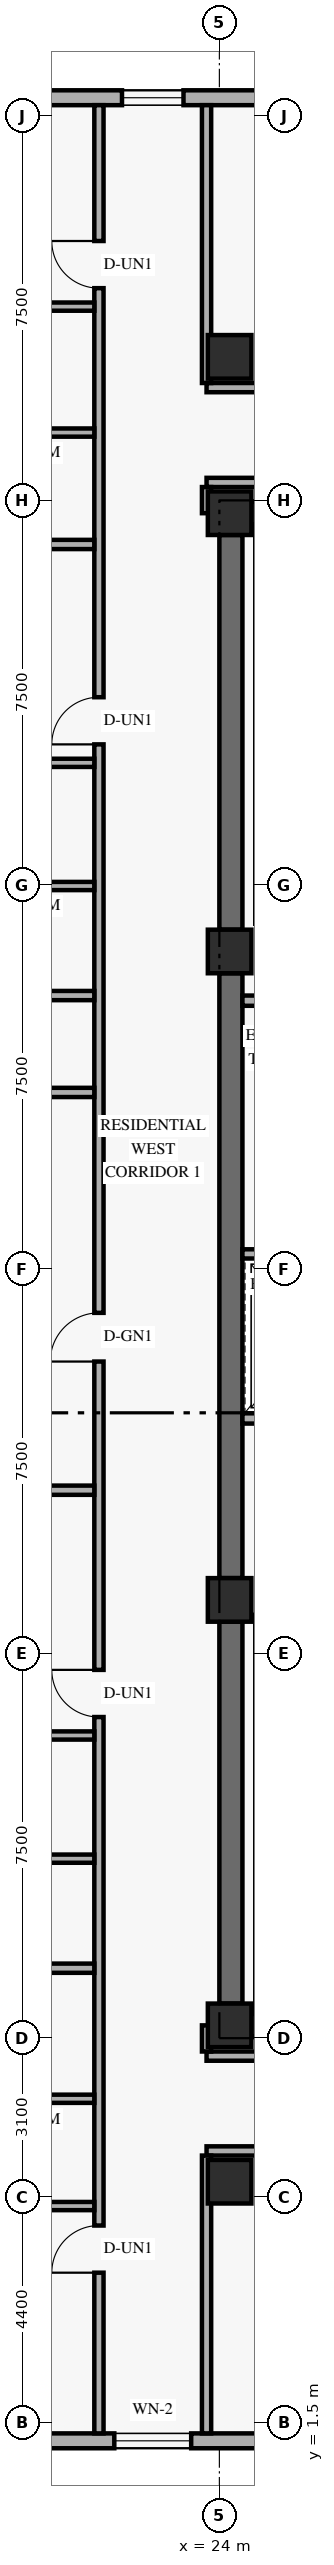
"""IFC4 building model, lengths in metres.
Left out: names, types, materials, properties, quantities, classifications, styles, units other than length and angle.
Written with IfcOpenShell. Run it as: python <this file> out.ifc"""

import sys

from ifc_helpers import new_model, si_unit, direction, frame, frame_2d, origin, origin_2d, place, context, subcontext, project, spatial, rectangle, extrude, element, fill, save


model = new_model("IFC4")
c1 = context("Model", 3, precision=1e-05, world=origin(), true_north=direction((0.0, 1.0)))
c2 = subcontext(c1, "Body", "Model", "MODEL_VIEW")
j1 = project(units=[si_unit("LENGTHUNIT", "METRE"), si_unit("PLANEANGLEUNIT", "RADIAN")], contexts=[c1])
p1 = place(None, origin())
s1 = spatial("IfcSite", under=j1, at=p1, CompositionType="ELEMENT")
p2 = place(p1, origin())
s2 = spatial("IfcBuilding", under=s1, at=p2, CompositionType="ELEMENT")
p3 = place(p2, frame((0.0, 0.0, 56.4)))
s3 = spatial("IfcBuildingStorey", under=s2, at=p3, CompositionType="ELEMENT", Elevation=56.4)
p4 = place(p3, frame((24.225, 9.675, 0.0), z_axis=(0.0, 0.0, 1.0), x_axis=(0.0, 1.0, 0.0)))
e1 = element("IfcWall", 1, at=p4, inside=s3, PredefinedType="SHEAR", context=c2, shape_type="SweptSolid", body=[
    extrude(rectangle(XDim=7.45, YDim=0.45, at=frame_2d((3.725, 0.0))), origin(), (0.0, 0.0, 1.0), 2.657),
])
p5 = place(p3, frame((24.225, 17.975, 0.0), z_axis=(0.0, 0.0, 1.0), x_axis=(0.0, 1.0, 0.0)))
e2 = element("IfcWall", 2, at=p5, inside=s3, PredefinedType="SHEAR", context=c2, shape_type="SweptSolid", body=[
    extrude(rectangle(XDim=11.8, YDim=0.45, at=frame_2d((5.9, 0.0))), origin(), (0.0, 0.0, 1.0), 2.657),
])
p6 = place(p3, frame((24.225, 30.625, 0.0), z_axis=(0.0, 0.0, 1.0), x_axis=(0.0, 1.0, 0.0)))
e3 = element("IfcWall", 3, at=p6, inside=s3, PredefinedType="SHEAR", context=c2, shape_type="SweptSolid", body=[
    extrude(rectangle(XDim=7.7, YDim=0.45, at=frame_2d((3.85, 0.0))), origin(), (0.0, 0.0, 1.0), 2.657),
])
for number, where, z_axis, x_axis in (
    (4, (24.625, 9.25, 0.0), (0.0, 0.0, 1.0), (1.0, 0.0, 0.0)),
    (5, (24.625, 38.75, 0.0), (0.0, 0.0, 1.0), (1.0, 0.0, 0.0)),
):
    element("IfcWall", number, at=place(p3, frame(where, z_axis=z_axis, x_axis=x_axis)), inside=s3, PredefinedType="SHEAR", context=c2, shape_type="SweptSolid", body=[
        extrude(rectangle(XDim=10.15, YDim=0.45, at=frame_2d((5.075, 0.0))), origin(), (0.0, 0.0, 1.0), 3.35),
    ])
for number, where, z_axis, x_axis in (
    (6, (24.2, 6.2, 0.0), (0.0, 0.0, 1.0), (1.0, 0.0, 0.0)),
    (7, (24.2, 9.25, 0.0), (0.0, 0.0, 1.0), (1.0, 0.0, 0.0)),
    (8, (24.2, 17.55, 0.0), (0.0, 0.0, 1.0), (1.0, 0.0, 0.0)),
    (9, (24.2, 30.2, 0.0), (0.0, 0.0, 1.0), (1.0, 0.0, 0.0)),
    (10, (24.2, 38.75, 0.0), (0.0, 0.0, 1.0), (1.0, 0.0, 0.0)),
    (11, (24.2, 41.8, 0.0), (0.0, 0.0, 1.0), (1.0, 0.0, 0.0)),
):
    element("IfcColumn", number, at=place(p3, frame(where, z_axis=z_axis, x_axis=x_axis)), inside=s3, PredefinedType="COLUMN", context=c2, shape_type="SweptSolid", body=[
        extrude(rectangle(XDim=0.85, YDim=0.85, at=origin_2d()), origin(), (0.0, 0.0, 1.0), 3.6),
    ])
p7 = place(p3, frame((5.42, 1.145, 0.0), z_axis=(0.0, 0.0, 1.0), x_axis=(1.0, 0.0, 0.0)))
e12 = element("IfcWall", 12, at=p7, inside=s3, PredefinedType="SOLIDWALL", context=c2, shape_type="SweptSolid", body=[
    extrude(rectangle(XDim=23.481, YDim=0.29, at=frame_2d((11.741, 0.0))), origin(), (0.0, 0.0, 1.0), 3.35),
])
p8 = place(p7, frame((7.365, 0.0, 0.85)))
e13 = element("IfcOpeningElement", 13, at=p8, cuts=e12, PredefinedType="OPENING", context=c2, shape_type="SweptSolid", body=[
    extrude(rectangle(XDim=1.5, YDim=1.55, at=frame_2d((0.75, 0.775))), frame((0.0, 0.155, 0.0), z_axis=(0.0, -1.0, 0.0), x_axis=(1.0, 0.0, 0.0)), (0.0, 0.0, 1.0), 0.31),
])
p9 = place(p7, frame((16.53, 0.0, 0.85)))
e14 = element("IfcOpeningElement", 14, at=p9, cuts=e12, PredefinedType="OPENING", context=c2, shape_type="SweptSolid", body=[
    extrude(rectangle(XDim=1.5, YDim=1.55, at=frame_2d((0.75, 0.775))), frame((0.0, 0.155, 0.0), z_axis=(0.0, -1.0, 0.0), x_axis=(1.0, 0.0, 0.0)), (0.0, 0.0, 1.0), 0.31),
])
p10 = place(p7, frame((20.156, 0.0, 0.85)))
e15 = element("IfcOpeningElement", 15, at=p10, cuts=e12, PredefinedType="OPENING", context=c2, shape_type="SweptSolid", body=[
    extrude(rectangle(XDim=1.5, YDim=1.55, at=frame_2d((0.75, 0.775))), frame((0.0, 0.155, 0.0), z_axis=(0.0, -1.0, 0.0), x_axis=(1.0, 0.0, 0.0)), (0.0, 0.0, 1.0), 0.31),
])
p11 = place(p3, frame((44.98, 46.855, 0.0), z_axis=(0.0, 0.0, 1.0), x_axis=(-1.0, 0.0, 0.0)))
e16 = element("IfcWall", 16, at=p11, inside=s3, PredefinedType="SOLIDWALL", context=c2, shape_type="SweptSolid", body=[
    extrude(rectangle(XDim=39.56, YDim=0.29, at=frame_2d((19.78, 0.0))), origin(), (0.0, 0.0, 1.0), 3.35),
])
p12 = place(p11, frame((30.845, 0.0, 0.85)))
e17 = element("IfcOpeningElement", 17, at=p12, cuts=e16, PredefinedType="OPENING", context=c2, shape_type="SweptSolid", body=[
    extrude(rectangle(XDim=1.2, YDim=1.5, at=frame_2d((0.6, 0.75))), frame((0.0, 0.155, 0.0), z_axis=(0.0, -1.0, 0.0), x_axis=(1.0, 0.0, 0.0)), (0.0, 0.0, 1.0), 0.31),
])
p13 = place(p11, frame((21.68, 0.0, 0.85)))
e18 = element("IfcOpeningElement", 18, at=p13, cuts=e16, PredefinedType="OPENING", context=c2, shape_type="SweptSolid", body=[
    extrude(rectangle(XDim=1.2, YDim=1.5, at=frame_2d((0.6, 0.75))), frame((0.0, 0.155, 0.0), z_axis=(0.0, -1.0, 0.0), x_axis=(1.0, 0.0, 0.0)), (0.0, 0.0, 1.0), 0.31),
])
p14 = place(p11, frame((17.829, 0.0, 0.85)))
e19 = element("IfcOpeningElement", 19, at=p14, cuts=e16, PredefinedType="OPENING", context=c2, shape_type="SweptSolid", body=[
    extrude(rectangle(XDim=1.2, YDim=1.5, at=frame_2d((0.6, 0.75))), frame((0.0, 0.155, 0.0), z_axis=(0.0, -1.0, 0.0), x_axis=(1.0, 0.0, 0.0)), (0.0, 0.0, 1.0), 0.31),
])
p15 = place(p11, frame((11.994, 0.0, 0.85)))
e20 = element("IfcOpeningElement", 20, at=p15, cuts=e16, PredefinedType="OPENING", context=c2, shape_type="SweptSolid", body=[
    extrude(rectangle(XDim=1.2, YDim=1.5, at=frame_2d((0.6, 0.75))), frame((0.0, 0.155, 0.0), z_axis=(0.0, -1.0, 0.0), x_axis=(1.0, 0.0, 0.0)), (0.0, 0.0, 1.0), 0.31),
])
p16 = place(p11, frame((7.895, 0.0, 0.85)))
e21 = element("IfcOpeningElement", 21, at=p16, cuts=e16, PredefinedType="OPENING", context=c2, shape_type="SweptSolid", body=[
    extrude(rectangle(XDim=1.2, YDim=1.5, at=frame_2d((0.6, 0.75))), frame((0.0, 0.155, 0.0), z_axis=(0.0, -1.0, 0.0), x_axis=(1.0, 0.0, 0.0)), (0.0, 0.0, 1.0), 0.31),
])
p17 = place(p11, frame((4.083, 0.0, 0.85)))
e22 = element("IfcOpeningElement", 22, at=p17, cuts=e16, PredefinedType="OPENING", context=c2, shape_type="SweptSolid", body=[
    extrude(rectangle(XDim=1.2, YDim=1.5, at=frame_2d((0.6, 0.75))), frame((0.0, 0.155, 0.0), z_axis=(0.0, -1.0, 0.0), x_axis=(1.0, 0.0, 0.0)), (0.0, 0.0, 1.0), 0.31),
])
p18 = place(p11, frame((0.367, 0.0, 0.85)))
e23 = element("IfcOpeningElement", 23, at=p18, cuts=e16, PredefinedType="OPENING", context=c2, shape_type="SweptSolid", body=[
    extrude(rectangle(XDim=1.2, YDim=1.5, at=frame_2d((0.6, 0.75))), frame((0.0, 0.155, 0.0), z_axis=(0.0, -1.0, 0.0), x_axis=(1.0, 0.0, 0.0)), (0.0, 0.0, 1.0), 0.31),
])
p19 = place(p3, frame((24.45, 21.09, 0.0), z_axis=(0.0, 0.0, 1.0), x_axis=(1.0, 0.0, 0.0)))
e24 = element("IfcWall", 24, at=p19, inside=s3, PredefinedType="STANDARD", context=c2, shape_type="SweptSolid", body=[
    extrude(rectangle(XDim=6.83, YDim=0.2, at=frame_2d((3.415, 0.0))), origin(), (0.0, 0.0, 1.0), 3.35),
])
p20 = place(p19, frame((0.72, 0.0, 0.0)))
e25 = element("IfcOpeningElement", 25, at=p20, cuts=e24, PredefinedType="OPENING", context=c2, shape_type="SweptSolid", body=[
    extrude(rectangle(XDim=1.1, YDim=2.2, at=frame_2d((0.55, 1.1))), frame((0.0, 0.11, 0.0), z_axis=(0.0, -1.0, 0.0), x_axis=(1.0, 0.0, 0.0)), (0.0, 0.0, 1.0), 0.22),
])
p21 = place(p19, frame((3.32, 0.0, 0.0)))
e26 = element("IfcOpeningElement", 26, at=p21, cuts=e24, PredefinedType="OPENING", context=c2, shape_type="SweptSolid", body=[
    extrude(rectangle(XDim=1.1, YDim=2.2, at=frame_2d((0.55, 1.1))), frame((0.0, 0.11, 0.0), z_axis=(0.0, -1.0, 0.0), x_axis=(1.0, 0.0, 0.0)), (0.0, 0.0, 1.0), 0.22),
])
p22 = place(p3, frame((24.45, 24.3, 0.0), z_axis=(0.0, 0.0, 1.0), x_axis=(1.0, 0.0, 0.0)))
e27 = element("IfcWall", 27, at=p22, inside=s3, PredefinedType="STANDARD", context=c2, shape_type="SweptSolid", body=[
    extrude(rectangle(XDim=6.83, YDim=0.18, at=frame_2d((3.415, 0.0))), origin(), (0.0, 0.0, 1.0), 3.35),
])
p23 = place(p3, frame((24.45, 29.24, 0.0), z_axis=(0.0, 0.0, 1.0), x_axis=(1.0, 0.0, 0.0)))
e28 = element("IfcWall", 28, at=p23, inside=s3, PredefinedType="STANDARD", context=c2, shape_type="SweptSolid", body=[
    extrude(rectangle(XDim=3.65, YDim=0.2, at=frame_2d((1.825, 0.0))), origin(), (0.0, 0.0, 1.0), 3.35),
])
p24 = place(p3, frame((21.65, 1.29, 0.0), z_axis=(0.0, 0.0, 1.0), x_axis=(0.0, 1.0, 0.0)))
e29 = element("IfcWall", 29, at=p24, inside=s3, PredefinedType="STANDARD", context=c2, shape_type="SweptSolid", body=[
    extrude(rectangle(XDim=45.42, YDim=0.18, at=frame_2d((22.71, 0.0))), origin(), (0.0, 0.0, 1.0), 2.639),
])
p25 = place(p24, frame((3.135, 0.0, 0.0)))
e30 = element("IfcOpeningElement", 30, at=p25, cuts=e29, PredefinedType="OPENING", context=c2, shape_type="SweptSolid", body=[
    extrude(rectangle(XDim=0.92, YDim=2.15, at=frame_2d((0.46, 1.075))), frame((0.0, 0.1, 0.0), z_axis=(0.0, -1.0, 0.0), x_axis=(1.0, 0.0, 0.0)), (0.0, 0.0, 1.0), 0.2),
])
p26 = place(p24, frame((13.975, 0.0, 0.0)))
e31 = element("IfcOpeningElement", 31, at=p26, cuts=e29, PredefinedType="OPENING", context=c2, shape_type="SweptSolid", body=[
    extrude(rectangle(XDim=0.92, YDim=2.15, at=frame_2d((0.46, 1.075))), frame((0.0, 0.1, 0.0), z_axis=(0.0, -1.0, 0.0), x_axis=(1.0, 0.0, 0.0)), (0.0, 0.0, 1.0), 0.2),
])
p27 = place(p24, frame((20.91, 0.0, 0.0)))
e32 = element("IfcOpeningElement", 32, at=p27, cuts=e29, PredefinedType="OPENING", context=c2, shape_type="SweptSolid", body=[
    extrude(rectangle(XDim=0.95, YDim=2.15, at=frame_2d((0.475, 1.075))), frame((0.0, 0.1, 0.0), z_axis=(0.0, -1.0, 0.0), x_axis=(1.0, 0.0, 0.0)), (0.0, 0.0, 1.0), 0.2),
])
p28 = place(p24, frame((32.95, 0.0, 0.0)))
e33 = element("IfcOpeningElement", 33, at=p28, cuts=e29, PredefinedType="OPENING", context=c2, shape_type="SweptSolid", body=[
    extrude(rectangle(XDim=0.92, YDim=2.15, at=frame_2d((0.46, 1.075))), frame((0.0, 0.1, 0.0), z_axis=(0.0, -1.0, 0.0), x_axis=(1.0, 0.0, 0.0)), (0.0, 0.0, 1.0), 0.2),
])
p29 = place(p24, frame((41.85, 0.0, 0.0)))
e34 = element("IfcOpeningElement", 34, at=p29, cuts=e29, PredefinedType="OPENING", context=c2, shape_type="SweptSolid", body=[
    extrude(rectangle(XDim=0.92, YDim=2.15, at=frame_2d((0.46, 1.075))), frame((0.0, 0.1, 0.0), z_axis=(0.0, -1.0, 0.0), x_axis=(1.0, 0.0, 0.0)), (0.0, 0.0, 1.0), 0.2),
])
p30 = place(p3, frame((23.75, 6.8, 0.0), z_axis=(0.0, 0.0, 1.0), x_axis=(1.0, 0.0, 0.0)))
e35 = element("IfcWall", 35, at=p30, inside=s3, PredefinedType="STANDARD", context=c2, shape_type="SweptSolid", body=[
    extrude(rectangle(XDim=11.67, YDim=0.18, at=frame_2d((5.835, 0.0))), origin(), (0.0, 0.0, 1.0), 2.639),
])
p31 = place(p30, frame((1.5, 0.0, 0.0)))
e36 = element("IfcOpeningElement", 36, at=p31, cuts=e35, PredefinedType="OPENING", context=c2, shape_type="SweptSolid", body=[
    extrude(rectangle(XDim=0.95, YDim=2.15, at=frame_2d((0.475, 1.075))), frame((0.0, 0.1, 0.0), z_axis=(0.0, -1.0, 0.0), x_axis=(1.0, 0.0, 0.0)), (0.0, 0.0, 1.0), 0.2),
])
p32 = place(p30, frame((5.341, 0.0, 0.0)))
e37 = element("IfcOpeningElement", 37, at=p32, cuts=e35, PredefinedType="OPENING", context=c2, shape_type="SweptSolid", body=[
    extrude(rectangle(XDim=0.92, YDim=2.15, at=frame_2d((0.46, 1.075))), frame((0.0, 0.1, 0.0), z_axis=(0.0, -1.0, 0.0), x_axis=(1.0, 0.0, 0.0)), (0.0, 0.0, 1.0), 0.2),
])
p33 = place(p3, frame((23.75, 8.65, 0.0), z_axis=(0.0, 0.0, 1.0), x_axis=(1.0, 0.0, 0.0)))
e38 = element("IfcWall", 38, at=p33, inside=s3, PredefinedType="STANDARD", context=c2, shape_type="SweptSolid", body=[
    extrude(rectangle(XDim=11.67, YDim=0.18, at=frame_2d((5.835, 0.0))), origin(), (0.0, 0.0, 1.0), 2.639),
])
p34 = place(p3, frame((23.75, 41.2, 0.0), z_axis=(0.0, 0.0, 1.0), x_axis=(1.0, 0.0, 0.0)))
e39 = element("IfcWall", 39, at=p34, inside=s3, PredefinedType="STANDARD", context=c2, shape_type="SweptSolid", body=[
    extrude(rectangle(XDim=11.67, YDim=0.18, at=frame_2d((5.835, 0.0))), origin(), (0.0, 0.0, 1.0), 2.639),
])
p35 = place(p34, frame((1.6, 0.0, 0.0)))
e40 = element("IfcOpeningElement", 40, at=p35, cuts=e39, PredefinedType="OPENING", context=c2, shape_type="SweptSolid", body=[
    extrude(rectangle(XDim=0.95, YDim=2.15, at=frame_2d((0.475, 1.075))), frame((0.0, 0.1, 0.0), z_axis=(0.0, -1.0, 0.0), x_axis=(1.0, 0.0, 0.0)), (0.0, 0.0, 1.0), 0.2),
])
p36 = place(p34, frame((8.176, 0.0, 0.0)))
e41 = element("IfcOpeningElement", 41, at=p36, cuts=e39, PredefinedType="OPENING", context=c2, shape_type="SweptSolid", body=[
    extrude(rectangle(XDim=0.92, YDim=2.15, at=frame_2d((0.46, 1.075))), frame((0.0, 0.1, 0.0), z_axis=(0.0, -1.0, 0.0), x_axis=(1.0, 0.0, 0.0)), (0.0, 0.0, 1.0), 0.2),
])
p37 = place(p3, frame((23.75, 39.35, 0.0), z_axis=(0.0, 0.0, 1.0), x_axis=(1.0, 0.0, 0.0)))
e42 = element("IfcWall", 42, at=p37, inside=s3, PredefinedType="STANDARD", context=c2, shape_type="SweptSolid", body=[
    extrude(rectangle(XDim=11.67, YDim=0.18, at=frame_2d((5.835, 0.0))), origin(), (0.0, 0.0, 1.0), 2.639),
])
for number, where, z_axis, x_axis in (
    (43, (23.75, 8.74, 0.0), (0.0, 0.0, 1.0), (0.0, 1.0, 0.0)),
    (44, (23.75, 38.75, 0.0), (0.0, 0.0, 1.0), (0.0, 1.0, 0.0)),
):
    element("IfcWall", number, at=place(p3, frame(where, z_axis=z_axis, x_axis=x_axis)), inside=s3, PredefinedType="STANDARD", context=c2, shape_type="SweptSolid", body=[
        extrude(rectangle(XDim=0.51, YDim=0.18, at=frame_2d((0.255, 0.0))), origin(), (0.0, 0.0, 1.0), 2.639),
    ])
p38 = place(p3, frame((14.68, 27.45, 0.0), z_axis=(0.0, 0.0, 1.0), x_axis=(1.0, 0.0, 0.0)))
e45 = element("IfcWall", 45, at=p38, inside=s3, PredefinedType="STANDARD", context=c2, shape_type="SweptSolid", body=[
    extrude(rectangle(XDim=6.88, YDim=0.18, at=frame_2d((3.44, 0.0))), origin(), (0.0, 0.0, 1.0), 2.639),
])
p39 = place(p3, frame((2.09, 29.34, 0.0), z_axis=(0.0, 0.0, 1.0), x_axis=(1.0, 0.0, 0.0)))
e46 = element("IfcWall", 46, at=p39, inside=s3, PredefinedType="STANDARD", context=c2, shape_type="SweptSolid", body=[
    extrude(rectangle(XDim=19.47, YDim=0.18, at=frame_2d((9.735, 0.0))), origin(), (0.0, 0.0, 1.0), 2.639),
])
p40 = place(p3, frame((2.09, 10.365, 0.0), z_axis=(0.0, 0.0, 1.0), x_axis=(1.0, 0.0, 0.0)))
e47 = element("IfcWall", 47, at=p40, inside=s3, PredefinedType="PARTITIONING", context=c2, shape_type="SweptSolid", body=[
    extrude(rectangle(XDim=19.47, YDim=0.18, at=frame_2d((9.735, 0.0))), origin(), (0.0, 0.0, 1.0), 2.639),
])
p41 = place(p3, frame((14.68, 19.69, 0.0), z_axis=(0.0, 0.0, 1.0), x_axis=(1.0, 0.0, 0.0)))
e48 = element("IfcWall", 48, at=p41, inside=s3, PredefinedType="PARTITIONING", context=c2, shape_type="SweptSolid", body=[
    extrude(rectangle(XDim=6.88, YDim=0.18, at=frame_2d((3.44, 0.0))), origin(), (0.0, 0.0, 1.0), 2.639),
])
p42 = place(p3, frame((16.03, 5.725, 0.0), z_axis=(0.0, 0.0, 1.0), x_axis=(1.0, 0.0, 0.0)))
e49 = element("IfcWall", 49, at=p42, inside=s3, PredefinedType="PLUMBINGWALL", context=c2, shape_type="SweptSolid", body=[
    extrude(rectangle(XDim=5.53, YDim=0.16, at=frame_2d((2.765, 0.0))), origin(), (0.0, 0.0, 1.0), 3.35),
])
p43 = place(p3, frame((16.19, 7.818, 0.0), z_axis=(0.0, 0.0, 1.0), x_axis=(1.0, 0.0, 0.0)))
e50 = element("IfcWall", 50, at=p43, inside=s3, PredefinedType="PLUMBINGWALL", context=c2, shape_type="SweptSolid", body=[
    extrude(rectangle(XDim=5.37, YDim=0.16, at=frame_2d((2.685, 0.0))), origin(), (0.0, 0.0, 1.0), 2.639),
])
p44 = place(p3, frame((19.03, 14.905, 0.0), z_axis=(0.0, 0.0, 1.0), x_axis=(1.0, 0.0, 0.0)))
e51 = element("IfcWall", 51, at=p44, inside=s3, PredefinedType="PLUMBINGWALL", context=c2, shape_type="SweptSolid", body=[
    extrude(rectangle(XDim=2.53, YDim=0.16, at=frame_2d((1.265, 0.0))), origin(), (0.0, 0.0, 1.0), 3.35),
])
p45 = place(p3, frame((19.19, 12.502, 0.0), z_axis=(0.0, 0.0, 1.0), x_axis=(1.0, 0.0, 0.0)))
e52 = element("IfcWall", 52, at=p45, inside=s3, PredefinedType="PLUMBINGWALL", context=c2, shape_type="SweptSolid", body=[
    extrude(rectangle(XDim=2.37, YDim=0.16, at=frame_2d((1.185, 0.0))), origin(), (0.0, 0.0, 1.0), 3.35),
])
p46 = place(p3, frame((2.09, 38.14, 0.0), z_axis=(0.0, 0.0, 1.0), x_axis=(1.0, 0.0, 0.0)))
e53 = element("IfcWall", 53, at=p46, inside=s3, PredefinedType="PARTITIONING", context=c2, shape_type="SweptSolid", body=[
    extrude(rectangle(XDim=19.47, YDim=0.18, at=frame_2d((9.735, 0.0))), origin(), (0.0, 0.0, 1.0), 2.639),
])
p47 = place(p3, frame((16.03, 33.88, 0.0), z_axis=(0.0, 0.0, 1.0), x_axis=(1.0, 0.0, 0.0)))
e54 = element("IfcWall", 54, at=p47, inside=s3, PredefinedType="PLUMBINGWALL", context=c2, shape_type="SweptSolid", body=[
    extrude(rectangle(XDim=5.53, YDim=0.16, at=frame_2d((2.765, 0.0))), origin(), (0.0, 0.0, 1.0), 2.639),
])
p48 = place(p3, frame((16.19, 31.477, 0.0), z_axis=(0.0, 0.0, 1.0), x_axis=(1.0, 0.0, 0.0)))
e55 = element("IfcWall", 55, at=p48, inside=s3, PredefinedType="PLUMBINGWALL", context=c2, shape_type="SweptSolid", body=[
    extrude(rectangle(XDim=5.37, YDim=0.16, at=frame_2d((2.685, 0.0))), origin(), (0.0, 0.0, 1.0), 2.639),
])
p49 = place(p3, frame((16.03, 42.78, 0.0), z_axis=(0.0, 0.0, 1.0), x_axis=(1.0, 0.0, 0.0)))
e56 = element("IfcWall", 56, at=p49, inside=s3, PredefinedType="PLUMBINGWALL", context=c2, shape_type="SweptSolid", body=[
    extrude(rectangle(XDim=5.53, YDim=0.16, at=frame_2d((2.765, 0.0))), origin(), (0.0, 0.0, 1.0), 3.35),
])
p50 = place(p3, frame((16.19, 40.323, 0.0), z_axis=(0.0, 0.0, 1.0), x_axis=(1.0, 0.0, 0.0)))
e57 = element("IfcWall", 57, at=p50, inside=s3, PredefinedType="PLUMBINGWALL", context=c2, shape_type="SweptSolid", body=[
    extrude(rectangle(XDim=5.37, YDim=0.16, at=frame_2d((2.685, 0.0))), origin(), (0.0, 0.0, 1.0), 2.639),
])
for number, where, z_axis, x_axis in (
    (58, (23.75, 1.29, 0.0), (0.0, 0.0, 1.0), (0.0, 1.0, 0.0)),
    (59, (23.75, 41.29, 0.0), (0.0, 0.0, 1.0), (0.0, 1.0, 0.0)),
):
    element("IfcWall", number, at=place(p3, frame(where, z_axis=z_axis, x_axis=x_axis)), inside=s3, PredefinedType="PARTITIONING", context=c2, shape_type="SweptSolid", body=[
        extrude(rectangle(XDim=5.42, YDim=0.18, at=frame_2d((2.71, 0.0))), origin(), (0.0, 0.0, 1.0), 2.799),
    ])
p51 = place(p9, origin())
e60 = element("IfcWindow", 60, at=p51, inside=s3, PartitioningType="SINGLE_PANEL", PredefinedType="WINDOW", context=c2, shape_type="SweptSolid", body=[
    extrude(rectangle(XDim=1.5, YDim=1.55, at=frame_2d((0.75, 0.775))), frame((0.0, 0.03, 0.0), z_axis=(0.0, -1.0, 0.0), x_axis=(1.0, 0.0, 0.0)), (0.0, 0.0, 1.0), 0.06),
])
fill(e14, e60)
p52 = place(p13, origin())
e61 = element("IfcWindow", 61, at=p52, inside=s3, PartitioningType="SINGLE_PANEL", PredefinedType="WINDOW", context=c2, shape_type="SweptSolid", body=[
    extrude(rectangle(XDim=1.2, YDim=1.5, at=frame_2d((0.6, 0.75))), frame((0.0, 0.03, 0.0), z_axis=(0.0, -1.0, 0.0), x_axis=(1.0, 0.0, 0.0)), (0.0, 0.0, 1.0), 0.06),
])
fill(e18, e61)
p53 = place(p25, origin())
e62 = element("IfcDoor", 62, at=p53, inside=s3, OperationType="SINGLE_SWING_LEFT", PredefinedType="DOOR", context=c2, shape_type="SweptSolid", body=[
    extrude(rectangle(XDim=0.92, YDim=2.15, at=frame_2d((0.46, 1.075))), frame((0.0, 0.025, 0.0), z_axis=(0.0, -1.0, 0.0), x_axis=(1.0, 0.0, 0.0)), (0.0, 0.0, 1.0), 0.05),
])
fill(e30, e62)
p54 = place(p26, origin())
e63 = element("IfcDoor", 63, at=p54, inside=s3, OperationType="SINGLE_SWING_RIGHT", PredefinedType="DOOR", context=c2, shape_type="SweptSolid", body=[
    extrude(rectangle(XDim=0.92, YDim=2.15, at=frame_2d((0.46, 1.075))), frame((0.0, 0.025, 0.0), z_axis=(0.0, -1.0, 0.0), x_axis=(1.0, 0.0, 0.0)), (0.0, 0.0, 1.0), 0.05),
])
fill(e31, e63)
p55 = place(p27, origin())
e64 = element("IfcDoor", 64, at=p55, inside=s3, OperationType="SINGLE_SWING_LEFT", PredefinedType="DOOR", context=c2, shape_type="SweptSolid", body=[
    extrude(rectangle(XDim=0.95, YDim=2.15, at=frame_2d((0.475, 1.075))), frame((0.0, 0.025, 0.0), z_axis=(0.0, -1.0, 0.0), x_axis=(1.0, 0.0, 0.0)), (0.0, 0.0, 1.0), 0.05),
])
fill(e32, e64)
p56 = place(p28, origin())
e65 = element("IfcDoor", 65, at=p56, inside=s3, OperationType="SINGLE_SWING_LEFT", PredefinedType="DOOR", context=c2, shape_type="SweptSolid", body=[
    extrude(rectangle(XDim=0.92, YDim=2.15, at=frame_2d((0.46, 1.075))), frame((0.0, 0.025, 0.0), z_axis=(0.0, -1.0, 0.0), x_axis=(1.0, 0.0, 0.0)), (0.0, 0.0, 1.0), 0.05),
])
fill(e33, e65)
p57 = place(p29, origin())
e66 = element("IfcDoor", 66, at=p57, inside=s3, OperationType="SINGLE_SWING_RIGHT", PredefinedType="DOOR", context=c2, shape_type="SweptSolid", body=[
    extrude(rectangle(XDim=0.92, YDim=2.15, at=frame_2d((0.46, 1.075))), frame((0.0, 0.025, 0.0), z_axis=(0.0, -1.0, 0.0), x_axis=(1.0, 0.0, 0.0)), (0.0, 0.0, 1.0), 0.05),
])
fill(e34, e66)
save(model, sys.argv[1])
